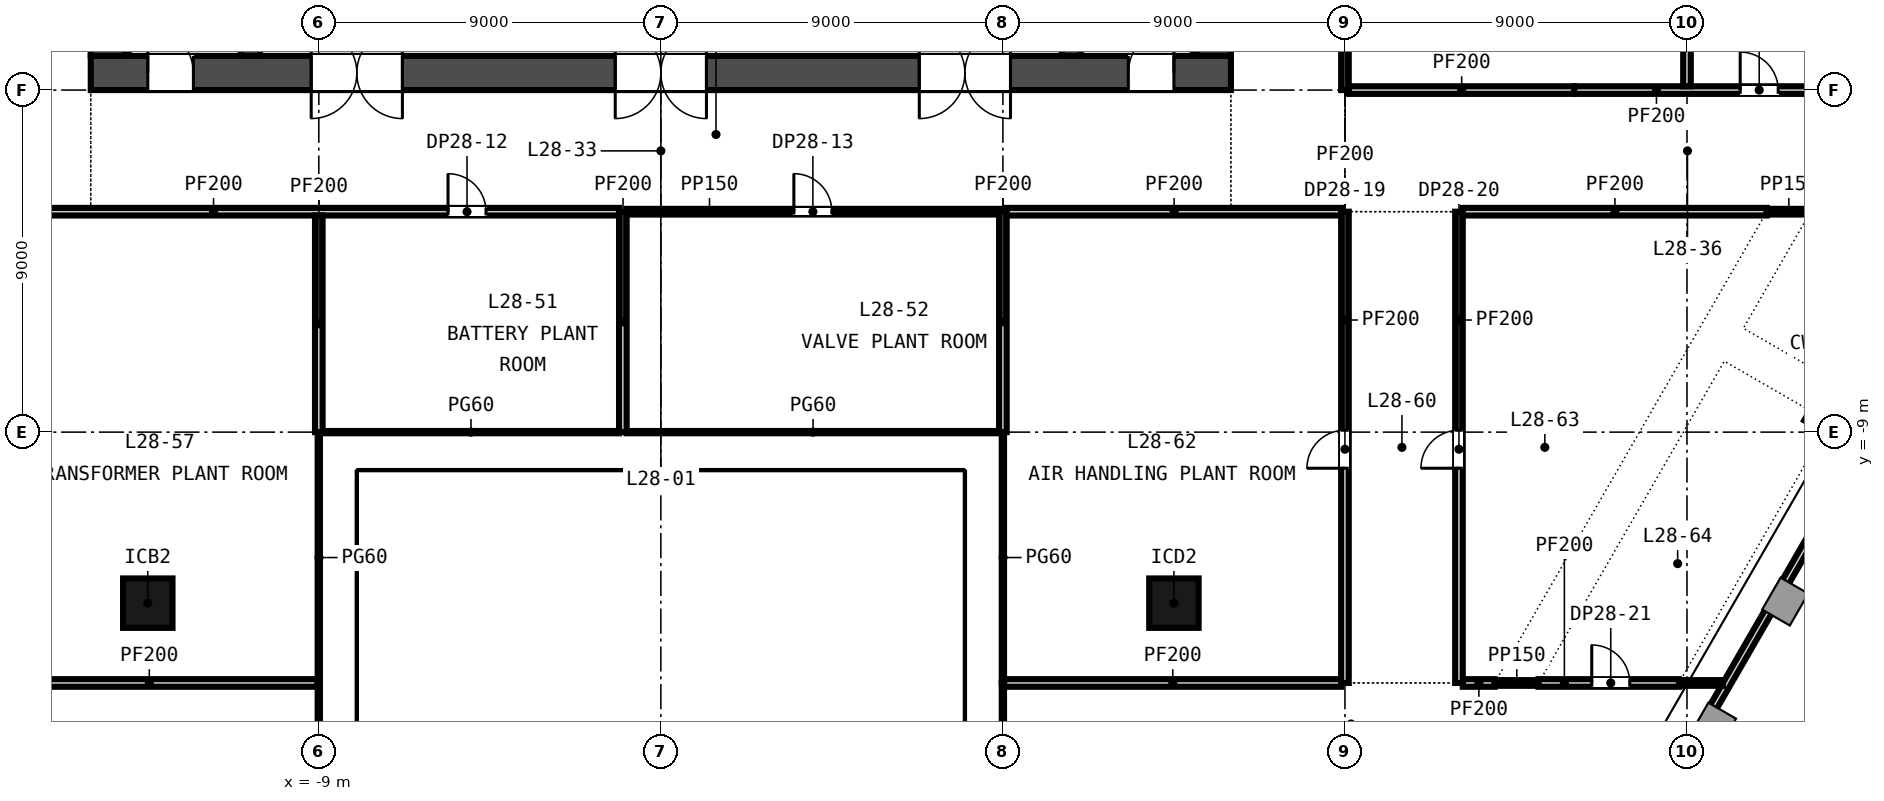
"""IFC4 building model, lengths in metres.
Left out: names, types, materials, properties, quantities, classifications, styles, units other than length and angle.
Written with IfcOpenShell. Run it as: python <this file> out.ifc"""

import sys

from ifc_helpers import new_model, si_unit, direction, frame, frame_2d, origin, origin_2d, place, context, subcontext, project, spatial, rectangle, extrude, element, fill, save


model = new_model("IFC4")
c1 = context("Model", 3, precision=1e-05, world=origin(), true_north=direction((0.0, 1.0)))
c2 = subcontext(c1, "Body", "Model", "MODEL_VIEW")
j1 = project(units=[si_unit("LENGTHUNIT", "METRE"), si_unit("PLANEANGLEUNIT", "RADIAN")], contexts=[c1])
p1 = place(None, origin())
s1 = spatial("IfcSite", under=j1, at=p1, CompositionType="ELEMENT")
p2 = place(p1, origin())
s2 = spatial("IfcBuilding", under=s1, at=p2, CompositionType="ELEMENT")
p3 = place(p2, frame((0.0, 0.0, 117.15)))
s3 = spatial("IfcBuildingStorey", under=s2, at=p3, CompositionType="ELEMENT", Elevation=117.15)
p4 = place(p3, frame((-15.0, 0.45, -0.3), z_axis=(0.0, 0.0, 1.0), x_axis=(1.0, 0.0, 0.0)))
e1 = element("IfcWall", 1, at=p4, inside=s3, PredefinedType="SOLIDWALL", context=c2, shape_type="SweptSolid", body=[
    extrude(rectangle(XDim=30.0, YDim=0.9, at=frame_2d((15.0, 0.0))), origin(), (0.0, 0.0, 1.0), 4.5),
])
p5 = place(p4, frame((5.8, 0.0, 0.3)))
e2 = element("IfcOpeningElement", 2, at=p5, cuts=e1, PredefinedType="OPENING", context=c2, shape_type="SweptSolid", body=[
    extrude(rectangle(XDim=2.4, YDim=2.4, at=frame_2d((1.2, 1.2))), frame((0.0, 0.46, 0.0), z_axis=(0.0, -1.0, 0.0), x_axis=(1.0, 0.0, 0.0)), (0.0, 0.0, 1.0), 0.92),
])
p6 = place(p4, frame((13.8, 0.0, 0.3)))
e3 = element("IfcOpeningElement", 3, at=p6, cuts=e1, PredefinedType="OPENING", context=c2, shape_type="SweptSolid", body=[
    extrude(rectangle(XDim=2.4, YDim=2.4, at=frame_2d((1.2, 1.2))), frame((0.0, 0.46, 0.0), z_axis=(0.0, -1.0, 0.0), x_axis=(1.0, 0.0, 0.0)), (0.0, 0.0, 1.0), 0.92),
])
p7 = place(p4, frame((21.8, 0.0, 0.3)))
e4 = element("IfcOpeningElement", 4, at=p7, cuts=e1, PredefinedType="OPENING", context=c2, shape_type="SweptSolid", body=[
    extrude(rectangle(XDim=2.4, YDim=2.4, at=frame_2d((1.2, 1.2))), frame((0.0, 0.46, 0.0), z_axis=(0.0, -1.0, 0.0), x_axis=(1.0, 0.0, 0.0)), (0.0, 0.0, 1.0), 0.92),
])
p8 = place(p4, frame((1.5, 0.0, 0.3)))
e5 = element("IfcOpeningElement", 5, at=p8, cuts=e1, PredefinedType="OPENING", context=c2, shape_type="SweptSolid", body=[
    extrude(rectangle(XDim=1.2, YDim=2.1, at=frame_2d((0.6, 1.05))), frame((0.0, 0.46, 0.0), z_axis=(0.0, -1.0, 0.0), x_axis=(1.0, 0.0, 0.0)), (0.0, 0.0, 1.0), 0.92),
])
p9 = place(p4, frame((27.3, 0.0, 0.3)))
e6 = element("IfcOpeningElement", 6, at=p9, cuts=e1, PredefinedType="OPENING", context=c2, shape_type="SweptSolid", body=[
    extrude(rectangle(XDim=1.2, YDim=2.1, at=frame_2d((0.6, 1.05))), frame((0.0, 0.46, 0.0), z_axis=(0.0, -1.0, 0.0), x_axis=(1.0, 0.0, 0.0)), (0.0, 0.0, 1.0), 0.92),
])
for number, where, z_axis, x_axis in (
    (7, (-14.55, 0.9, -0.3), (0.0, 0.0, 1.0), (0.0, 1.0, 0.0)),
    (8, (14.55, 0.9, -0.3), (0.0, 0.0, 1.0), (0.0, 1.0, 0.0)),
):
    element("IfcWall", number, at=place(p3, frame(where, z_axis=z_axis, x_axis=x_axis)), inside=s3, PredefinedType="SOLIDWALL", context=c2, shape_type="SweptSolid", body=[
        extrude(rectangle(XDim=13.2, YDim=0.9, at=frame_2d((6.6, 0.0))), origin(), (0.0, 0.0, 1.0), 4.5),
    ])
for number, where, z_axis, x_axis in (
    (9, (-10.8, 0.9, -0.3), (0.0, 0.0, 1.0), (0.0, 1.0, 0.0)),
    (10, (10.8, 0.9, -0.3), (0.0, 0.0, 1.0), (0.0, 1.0, 0.0)),
):
    element("IfcWall", number, at=place(p3, frame(where, z_axis=z_axis, x_axis=x_axis)), inside=s3, PredefinedType="SOLIDWALL", context=c2, shape_type="SweptSolid", body=[
        extrude(rectangle(XDim=13.2, YDim=0.5, at=frame_2d((6.6, 0.0))), origin(), (0.0, 0.0, 1.0), 4.5),
    ])
p10 = place(p3, frame((31.177, -8.4, -0.3), z_axis=(0.0, 0.0, 1.0), x_axis=(0.5, 0.866025403784, 0.0)))
e11 = element("IfcColumn", 11, at=p10, inside=s3, PredefinedType="COLUMN", context=c2, shape_type="SweptSolid", body=[
    extrude(rectangle(XDim=1.6, YDim=1.6, at=origin_2d()), origin(), (0.0, 0.0, 1.0), 4.5),
])
for number, where, z_axis, x_axis in (
    (12, (-13.5, -13.5, -0.3), (0.0, 0.0, 1.0), (1.0, 0.0, 0.0)),
    (13, (13.5, -13.5, -0.3), (0.0, 0.0, 1.0), (1.0, 0.0, 0.0)),
):
    element("IfcColumn", number, at=place(p3, frame(where, z_axis=z_axis, x_axis=x_axis)), inside=s3, PredefinedType="COLUMN", context=c2, shape_type="SweptSolid", body=[
        extrude(rectangle(XDim=1.3, YDim=1.3, at=origin_2d()), origin(), (0.0, 0.0, 1.0), 4.5),
    ])
for number, where, z_axis, x_axis in (
    (14, (-14.05, 0.9, 0.0), (0.0, 0.0, 1.0), (0.0, 1.0, 0.0)),
    (15, (14.05, 0.9, 0.0), (0.0, 0.0, 1.0), (0.0, 1.0, 0.0)),
):
    element("IfcWall", number, at=place(p3, frame(where, z_axis=z_axis, x_axis=x_axis)), inside=s3, PredefinedType="SOLIDWALL", context=c2, shape_type="SweptSolid", body=[
        extrude(rectangle(XDim=13.2, YDim=0.1, at=frame_2d((6.6, 0.0))), origin(), (0.0, 0.0, 1.0), 4.2),
    ])
for number, where, z_axis, x_axis in (
    (16, (-17.9, -15.6, 0.0), (0.0, 0.0, 1.0), (1.0, 0.0, 0.0)),
    (17, (9.03, -15.6, 0.0), (0.0, 0.0, 1.0), (1.0, 0.0, 0.0)),
):
    element("IfcWall", number, at=place(p3, frame(where, z_axis=z_axis, x_axis=x_axis)), inside=s3, PredefinedType="PARTITIONING", context=c2, shape_type="SweptSolid", body=[
        extrude(rectangle(XDim=8.87, YDim=0.2, at=frame_2d((4.435, 0.0))), origin(), (0.0, 0.0, 1.0), 4.2),
    ])
p11 = place(p3, frame((21.1, -15.6, 0.0), z_axis=(0.0, 0.0, 1.0), x_axis=(1.0, 0.0, 0.0)))
e18 = element("IfcWall", 18, at=p11, inside=s3, PredefinedType="PARTITIONING", context=c2, shape_type="SweptSolid", body=[
    extrude(rectangle(XDim=0.839, YDim=0.2, at=frame_2d((0.419, 0.0))), origin(), (0.0, 0.0, 1.0), 4.2),
])
p12 = place(p3, frame((21.94, -15.6, 0.0), z_axis=(0.0, 0.0, 1.0), x_axis=(1.0, 0.0, 0.0)))
e19 = element("IfcWall", 19, at=p12, inside=s3, PredefinedType="PARTITIONING", context=c2, shape_type="SweptSolid", body=[
    extrude(rectangle(XDim=1.153, YDim=0.15, at=frame_2d((0.576, 0.0))), origin(), (0.0, 0.0, 1.0), 4.2),
])
p13 = place(p3, frame((23.094, -15.6, 0.0), z_axis=(0.0, 0.0, 1.0), x_axis=(1.0, 0.0, 0.0)))
e20 = element("IfcWall", 20, at=p13, inside=s3, PredefinedType="PARTITIONING", context=c2, shape_type="SweptSolid", body=[
    extrude(rectangle(XDim=3.695, YDim=0.2, at=frame_2d((1.848, 0.0))), origin(), (0.0, 0.0, 1.0), 4.2),
])
p14 = place(p13, frame((1.4, 0.0, 0.0)))
e21 = element("IfcOpeningElement", 21, at=p14, cuts=e20, PredefinedType="OPENING", context=c2, shape_type="SweptSolid", body=[
    extrude(rectangle(XDim=1.0, YDim=2.1, at=frame_2d((0.5, 1.05))), frame((0.0, 0.11, 0.0), z_axis=(0.0, -1.0, 0.0), x_axis=(1.0, 0.0, 0.0)), (0.0, 0.0, 1.0), 0.22),
])
p15 = place(p3, frame((26.79, -15.6, 0.0), z_axis=(0.0, 0.0, 1.0), x_axis=(1.0, 0.0, 0.0)))
e22 = element("IfcWall", 22, at=p15, inside=s3, PredefinedType="PARTITIONING", context=c2, shape_type="SweptSolid", body=[
    extrude(rectangle(XDim=1.154, YDim=0.15, at=frame_2d((0.577, 0.0))), origin(), (0.0, 0.0, 1.0), 4.2),
])
p16 = place(p3, frame((-8.9, -9.0, 0.0), z_axis=(0.0, 0.0, 1.0), x_axis=(1.0, 0.0, 0.0)))
e23 = element("IfcWall", 23, at=p16, inside=s3, PredefinedType="PARTITIONING", context=c2, shape_type="SweptSolid", body=[
    extrude(rectangle(XDim=7.8, YDim=0.06, at=frame_2d((3.9, 0.0))), origin(), (0.0, 0.0, 1.0), 4.2),
])
p17 = place(p3, frame((-0.9, -9.0, 0.0), z_axis=(0.0, 0.0, 1.0), x_axis=(1.0, 0.0, 0.0)))
e24 = element("IfcWall", 24, at=p17, inside=s3, PredefinedType="PARTITIONING", context=c2, shape_type="SweptSolid", body=[
    extrude(rectangle(XDim=9.8, YDim=0.06, at=frame_2d((4.9, 0.0))), origin(), (0.0, 0.0, 1.0), 4.2),
])
p18 = place(p3, frame((-17.9, -3.2, 0.0), z_axis=(0.0, 0.0, 1.0), x_axis=(1.0, 0.0, 0.0)))
e25 = element("IfcWall", 25, at=p18, inside=s3, PredefinedType="PARTITIONING", context=c2, shape_type="SweptSolid", body=[
    extrude(rectangle(XDim=16.8, YDim=0.2, at=frame_2d((8.4, 0.0))), origin(), (0.0, 0.0, 1.0), 4.2),
])
p19 = place(p18, frame((12.3, 0.0, 0.0)))
e26 = element("IfcOpeningElement", 26, at=p19, cuts=e25, PredefinedType="OPENING", context=c2, shape_type="SweptSolid", body=[
    extrude(rectangle(XDim=1.0, YDim=2.1, at=frame_2d((0.5, 1.05))), frame((0.0, 0.11, 0.0), z_axis=(0.0, -1.0, 0.0), x_axis=(1.0, 0.0, 0.0)), (0.0, 0.0, 1.0), 0.22),
])
p20 = place(p3, frame((-0.9, -3.2, 0.0), z_axis=(0.0, 0.0, 1.0), x_axis=(1.0, 0.0, 0.0)))
e27 = element("IfcWall", 27, at=p20, inside=s3, PredefinedType="PARTITIONING", context=c2, shape_type="SweptSolid", body=[
    extrude(rectangle(XDim=9.8, YDim=0.15, at=frame_2d((4.9, 0.0))), origin(), (0.0, 0.0, 1.0), 4.2),
])
p21 = place(p20, frame((4.4, 0.0, 0.0)))
e28 = element("IfcOpeningElement", 28, at=p21, cuts=e27, PredefinedType="OPENING", context=c2, shape_type="SweptSolid", body=[
    extrude(rectangle(XDim=1.0, YDim=2.1, at=frame_2d((0.5, 1.05))), frame((0.0, 0.085, 0.0), z_axis=(0.0, -1.0, 0.0), x_axis=(1.0, 0.0, 0.0)), (0.0, 0.0, 1.0), 0.17),
])
p22 = place(p3, frame((9.1, -3.2, 0.0), z_axis=(0.0, 0.0, 1.0), x_axis=(1.0, 0.0, 0.0)))
e29 = element("IfcWall", 29, at=p22, inside=s3, PredefinedType="PARTITIONING", context=c2, shape_type="SweptSolid", body=[
    extrude(rectangle(XDim=8.8, YDim=0.2, at=frame_2d((4.4, 0.0))), origin(), (0.0, 0.0, 1.0), 4.2),
])
p23 = place(p3, frame((21.1, -3.2, 0.0), z_axis=(0.0, 0.0, 1.0), x_axis=(1.0, 0.0, 0.0)))
e30 = element("IfcWall", 30, at=p23, inside=s3, PredefinedType="PARTITIONING", context=c2, shape_type="SweptSolid", body=[
    extrude(rectangle(XDim=7.998, YDim=0.2, at=frame_2d((3.999, 0.0))), origin(), (0.0, 0.0, 1.0), 4.2),
])
p24 = place(p3, frame((29.1, -3.2, 0.0), z_axis=(0.0, 0.0, 1.0), x_axis=(1.0, 0.0, 0.0)))
e31 = element("IfcWall", 31, at=p24, inside=s3, PredefinedType="PARTITIONING", context=c2, shape_type="SweptSolid", body=[
    extrude(rectangle(XDim=1.152, YDim=0.15, at=frame_2d((0.576, 0.0))), origin(), (0.0, 0.0, 1.0), 4.2),
])
p25 = place(p3, frame((18.1, 0.0, 0.0), z_axis=(0.0, 0.0, 1.0), x_axis=(1.0, 0.0, 0.0)))
e32 = element("IfcWall", 32, at=p25, inside=s3, PredefinedType="PARTITIONING", context=c2, shape_type="SweptSolid", body=[
    extrude(rectangle(XDim=5.933, YDim=0.2, at=frame_2d((2.967, 0.0))), origin(), (0.0, 0.0, 1.0), 4.2),
])
p26 = place(p3, frame((24.033, 0.0, 0.0), z_axis=(0.0, 0.0, 1.0), x_axis=(1.0, 0.0, 0.0)))
e33 = element("IfcWall", 33, at=p26, inside=s3, PredefinedType="PARTITIONING", context=c2, shape_type="SweptSolid", body=[
    extrude(rectangle(XDim=6.913, YDim=0.2, at=frame_2d((3.457, 0.0))), origin(), (0.0, 0.0, 1.0), 3.6),
])
p27 = place(p26, frame((4.367, 0.0, 0.0)))
e34 = element("IfcOpeningElement", 34, at=p27, cuts=e33, PredefinedType="OPENING", context=c2, shape_type="SweptSolid", body=[
    extrude(rectangle(XDim=1.0, YDim=2.1, at=frame_2d((0.5, 1.05))), frame((0.0, 0.11, 0.0), z_axis=(0.0, -1.0, 0.0), x_axis=(1.0, 0.0, 0.0)), (0.0, 0.0, 1.0), 0.22),
])
p28 = place(p3, frame((-9.0, -18.999, 0.0), z_axis=(0.0, 0.0, 1.0), x_axis=(0.0, 1.0, 0.0)))
e35 = element("IfcWall", 35, at=p28, inside=s3, PredefinedType="PARTITIONING", context=c2, shape_type="SweptSolid", body=[
    extrude(rectangle(XDim=3.398, YDim=0.06, at=frame_2d((1.699, 0.0))), origin(), (0.0, 0.0, 1.0), 4.2),
])
p29 = place(p3, frame((-9.0, -15.599, 0.0), z_axis=(0.0, 0.0, 1.0), x_axis=(0.0, 1.0, 0.0)))
e36 = element("IfcWall", 36, at=p29, inside=s3, PredefinedType="PARTITIONING", context=c2, shape_type="SweptSolid", body=[
    extrude(rectangle(XDim=6.598, YDim=0.06, at=frame_2d((3.299, 0.0))), origin(), (0.0, 0.0, 1.0), 4.2),
])
p30 = place(p3, frame((-9.0, -9.0, 0.0), z_axis=(0.0, 0.0, 1.0), x_axis=(0.0, 1.0, 0.0)))
e37 = element("IfcWall", 37, at=p30, inside=s3, PredefinedType="PARTITIONING", context=c2, shape_type="SweptSolid", body=[
    extrude(rectangle(XDim=5.7, YDim=0.2, at=frame_2d((2.85, 0.0))), origin(), (0.0, 0.0, 1.0), 4.2),
])
p31 = place(p3, frame((-1.0, -9.0, 0.0), z_axis=(0.0, 0.0, 1.0), x_axis=(0.0, 1.0, 0.0)))
e38 = element("IfcWall", 38, at=p31, inside=s3, PredefinedType="PARTITIONING", context=c2, shape_type="SweptSolid", body=[
    extrude(rectangle(XDim=5.8, YDim=0.2, at=frame_2d((2.9, 0.0))), origin(), (0.0, 0.0, 1.0), 4.2),
])
p32 = place(p3, frame((9.0, -18.999, 0.0), z_axis=(0.0, 0.0, 1.0), x_axis=(0.0, 1.0, 0.0)))
e39 = element("IfcWall", 39, at=p32, inside=s3, PredefinedType="PARTITIONING", context=c2, shape_type="SweptSolid", body=[
    extrude(rectangle(XDim=3.398, YDim=0.06, at=frame_2d((1.699, 0.0))), origin(), (0.0, 0.0, 1.0), 4.2),
])
p33 = place(p3, frame((9.0, -15.599, 0.0), z_axis=(0.0, 0.0, 1.0), x_axis=(0.0, 1.0, 0.0)))
e40 = element("IfcWall", 40, at=p33, inside=s3, PredefinedType="PARTITIONING", context=c2, shape_type="SweptSolid", body=[
    extrude(rectangle(XDim=6.598, YDim=0.06, at=frame_2d((3.299, 0.0))), origin(), (0.0, 0.0, 1.0), 4.2),
])
p34 = place(p3, frame((9.0, -9.0, 0.0), z_axis=(0.0, 0.0, 1.0), x_axis=(0.0, 1.0, 0.0)))
e41 = element("IfcWall", 41, at=p34, inside=s3, PredefinedType="PARTITIONING", context=c2, shape_type="SweptSolid", body=[
    extrude(rectangle(XDim=5.8, YDim=0.2, at=frame_2d((2.9, 0.0))), origin(), (0.0, 0.0, 1.0), 4.2),
])
p35 = place(p3, frame((18.0, -15.6, 0.0), z_axis=(0.0, 0.0, 1.0), x_axis=(0.0, 1.0, 0.0)))
e42 = element("IfcWall", 42, at=p35, inside=s3, PredefinedType="PARTITIONING", context=c2, shape_type="SweptSolid", body=[
    extrude(rectangle(XDim=12.4, YDim=0.2, at=frame_2d((6.2, 0.0))), origin(), (0.0, 0.0, 1.0), 4.2),
])
p36 = place(p35, frame((5.65, 0.0, 0.0)))
e43 = element("IfcOpeningElement", 43, at=p36, cuts=e42, PredefinedType="OPENING", context=c2, shape_type="SweptSolid", body=[
    extrude(rectangle(XDim=1.0, YDim=2.1, at=frame_2d((0.5, 1.05))), frame((0.0, 0.11, 0.0), z_axis=(0.0, -1.0, 0.0), x_axis=(1.0, 0.0, 0.0)), (0.0, 0.0, 1.0), 0.22),
])
p37 = place(p3, frame((18.0, 0.0, 0.0), z_axis=(0.0, 0.0, 1.0), x_axis=(0.0, 1.0, 0.0)))
e44 = element("IfcWall", 44, at=p37, inside=s3, PredefinedType="PARTITIONING", context=c2, shape_type="SweptSolid", body=[
    extrude(rectangle(XDim=14.15, YDim=0.2, at=frame_2d((7.075, 0.0))), origin(), (0.0, 0.0, 1.0), 4.2),
])
p38 = place(p37, frame((6.65, 0.0, 0.0)))
e45 = element("IfcOpeningElement", 45, at=p38, cuts=e44, PredefinedType="OPENING", context=c2, shape_type="SweptSolid", body=[
    extrude(rectangle(XDim=1.0, YDim=2.1, at=frame_2d((0.5, 1.05))), frame((0.0, 0.11, 0.0), z_axis=(0.0, -1.0, 0.0), x_axis=(1.0, 0.0, 0.0)), (0.0, 0.0, 1.0), 0.22),
])
p39 = place(p3, frame((21.0, -15.6, 0.0), z_axis=(0.0, 0.0, 1.0), x_axis=(0.0, 1.0, 0.0)))
e46 = element("IfcWall", 46, at=p39, inside=s3, PredefinedType="PARTITIONING", context=c2, shape_type="SweptSolid", body=[
    extrude(rectangle(XDim=12.4, YDim=0.2, at=frame_2d((6.2, 0.0))), origin(), (0.0, 0.0, 1.0), 4.2),
])
p40 = place(p39, frame((5.65, 0.0, 0.0)))
e47 = element("IfcOpeningElement", 47, at=p40, cuts=e46, PredefinedType="OPENING", context=c2, shape_type="SweptSolid", body=[
    extrude(rectangle(XDim=1.0, YDim=2.1, at=frame_2d((0.5, 1.05))), frame((0.0, 0.11, 0.0), z_axis=(0.0, -1.0, 0.0), x_axis=(1.0, 0.0, 0.0)), (0.0, 0.0, 1.0), 0.22),
])
p41 = place(p3, frame((27.0, 0.1, 0.0), z_axis=(0.0, 0.0, 1.0), x_axis=(0.0, 1.0, 0.0)))
e48 = element("IfcWall", 48, at=p41, inside=s3, PredefinedType="PARTITIONING", context=c2, shape_type="SweptSolid", body=[
    extrude(rectangle(XDim=9.051, YDim=0.2, at=frame_2d((4.525, 0.0))), origin(), (0.0, 0.0, 1.0), 4.2),
])
p42 = place(p3, frame((38.203, 1.97, 0.0), z_axis=(0.0, 0.0, 1.0), x_axis=(-0.499999050453, -0.866025952005, 0.0)))
e49 = element("IfcWall", 49, at=p42, inside=s3, PredefinedType="PARTITIONING", context=c2, shape_type="SweptSolid", body=[
    extrude(rectangle(XDim=31.53, YDim=0.2, at=frame_2d((15.765, 0.0))), origin(), (0.0, 0.0, 1.0), 4.2),
])
p43 = place(p5, origin())
e50 = element("IfcDoor", 50, at=p43, inside=s3, OperationType="DOUBLE_DOOR_DOUBLE_SWING", PredefinedType="DOOR", context=c2, shape_type="SweptSolid", body=[
    extrude(rectangle(XDim=2.4, YDim=2.4, at=frame_2d((1.2, 1.2))), frame((0.0, 0.025, 0.0), z_axis=(0.0, -1.0, 0.0), x_axis=(1.0, 0.0, 0.0)), (0.0, 0.0, 1.0), 0.05),
])
fill(e2, e50)
p44 = place(p6, origin())
e51 = element("IfcDoor", 51, at=p44, inside=s3, OperationType="DOUBLE_DOOR_DOUBLE_SWING", PredefinedType="DOOR", context=c2, shape_type="SweptSolid", body=[
    extrude(rectangle(XDim=2.4, YDim=2.4, at=frame_2d((1.2, 1.2))), frame((0.0, 0.025, 0.0), z_axis=(0.0, -1.0, 0.0), x_axis=(1.0, 0.0, 0.0)), (0.0, 0.0, 1.0), 0.05),
])
fill(e3, e51)
p45 = place(p7, origin())
e52 = element("IfcDoor", 52, at=p45, inside=s3, OperationType="DOUBLE_DOOR_DOUBLE_SWING", PredefinedType="DOOR", context=c2, shape_type="SweptSolid", body=[
    extrude(rectangle(XDim=2.4, YDim=2.4, at=frame_2d((1.2, 1.2))), frame((0.0, 0.025, 0.0), z_axis=(0.0, -1.0, 0.0), x_axis=(1.0, 0.0, 0.0)), (0.0, 0.0, 1.0), 0.05),
])
fill(e4, e52)
p46 = place(p8, origin())
e53 = element("IfcDoor", 53, at=p46, inside=s3, OperationType="SINGLE_SWING_LEFT", PredefinedType="DOOR", context=c2, shape_type="SweptSolid", body=[
    extrude(rectangle(XDim=1.2, YDim=2.1, at=frame_2d((0.6, 1.05))), frame((0.0, 0.025, 0.0), z_axis=(0.0, -1.0, 0.0), x_axis=(1.0, 0.0, 0.0)), (0.0, 0.0, 1.0), 0.05),
])
fill(e5, e53)
p47 = place(p9, origin())
e54 = element("IfcDoor", 54, at=p47, inside=s3, OperationType="SINGLE_SWING_RIGHT", PredefinedType="DOOR", context=c2, shape_type="SweptSolid", body=[
    extrude(rectangle(XDim=1.2, YDim=2.1, at=frame_2d((0.6, 1.05))), frame((0.0, 0.025, 0.0), z_axis=(0.0, -1.0, 0.0), x_axis=(1.0, 0.0, 0.0)), (0.0, 0.0, 1.0), 0.05),
])
fill(e6, e54)
p48 = place(p27, origin())
e55 = element("IfcDoor", 55, at=p48, inside=s3, OperationType="SINGLE_SWING_LEFT", PredefinedType="DOOR", context=c2, shape_type="SweptSolid", body=[
    extrude(rectangle(XDim=1.0, YDim=2.1, at=frame_2d((0.5, 1.05))), frame((0.0, 0.025, 0.0), z_axis=(0.0, -1.0, 0.0), x_axis=(1.0, 0.0, 0.0)), (0.0, 0.0, 1.0), 0.05),
])
fill(e34, e55)
p49 = place(p19, origin())
e56 = element("IfcDoor", 56, at=p49, inside=s3, OperationType="SINGLE_SWING_LEFT", PredefinedType="DOOR", context=c2, shape_type="SweptSolid", body=[
    extrude(rectangle(XDim=1.0, YDim=2.1, at=frame_2d((0.5, 1.05))), frame((0.0, 0.025, 0.0), z_axis=(0.0, -1.0, 0.0), x_axis=(1.0, 0.0, 0.0)), (0.0, 0.0, 1.0), 0.05),
])
fill(e26, e56)
p50 = place(p21, origin())
e57 = element("IfcDoor", 57, at=p50, inside=s3, OperationType="SINGLE_SWING_LEFT", PredefinedType="DOOR", context=c2, shape_type="SweptSolid", body=[
    extrude(rectangle(XDim=1.0, YDim=2.1, at=frame_2d((0.5, 1.05))), frame((0.0, 0.025, 0.0), z_axis=(0.0, -1.0, 0.0), x_axis=(1.0, 0.0, 0.0)), (0.0, 0.0, 1.0), 0.05),
])
fill(e28, e57)
p51 = place(p36, origin())
e58 = element("IfcDoor", 58, at=p51, inside=s3, OperationType="SINGLE_SWING_LEFT", PredefinedType="DOOR", context=c2, shape_type="SweptSolid", body=[
    extrude(rectangle(XDim=1.0, YDim=2.1, at=frame_2d((0.5, 1.05))), frame((0.0, 0.025, 0.0), z_axis=(0.0, -1.0, 0.0), x_axis=(1.0, 0.0, 0.0)), (0.0, 0.0, 1.0), 0.05),
])
fill(e43, e58)
p52 = place(p40, origin())
e59 = element("IfcDoor", 59, at=p52, inside=s3, OperationType="SINGLE_SWING_LEFT", PredefinedType="DOOR", context=c2, shape_type="SweptSolid", body=[
    extrude(rectangle(XDim=1.0, YDim=2.1, at=frame_2d((0.5, 1.05))), frame((0.0, 0.025, 0.0), z_axis=(0.0, -1.0, 0.0), x_axis=(1.0, 0.0, 0.0)), (0.0, 0.0, 1.0), 0.05),
])
fill(e47, e59)
p53 = place(p14, origin())
e60 = element("IfcDoor", 60, at=p53, inside=s3, OperationType="SINGLE_SWING_LEFT", PredefinedType="DOOR", context=c2, shape_type="SweptSolid", body=[
    extrude(rectangle(XDim=1.0, YDim=2.1, at=frame_2d((0.5, 1.05))), frame((0.0, 0.025, 0.0), z_axis=(0.0, -1.0, 0.0), x_axis=(1.0, 0.0, 0.0)), (0.0, 0.0, 1.0), 0.05),
])
fill(e21, e60)
save(model, sys.argv[1])
